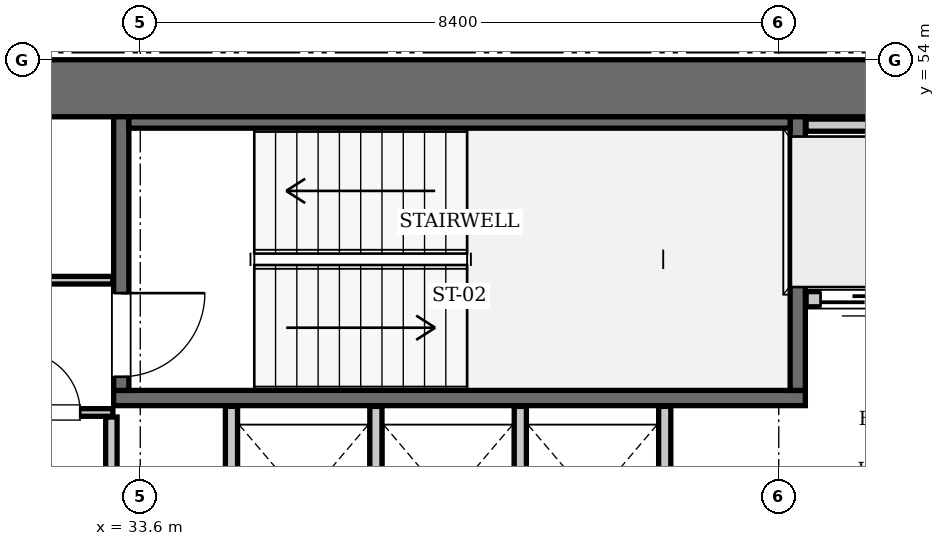
"""IFC4 building model, lengths in metres.
Left out: names, types, materials, properties, quantities, classifications, styles, units other than length and angle.
Written with IfcOpenShell. Run it as: python <this file> out.ifc"""

import sys

from ifc_helpers import new_model, si_unit, direction, frame, frame_2d, origin, place, context, subcontext, project, spatial, rectangle, extrude, element, fill, save


model = new_model("IFC4")
c1 = context("Model", 3, precision=1e-05, world=origin(), true_north=direction((0.0, 1.0)))
c2 = subcontext(c1, "Body", "Model", "MODEL_VIEW")
j1 = project(units=[si_unit("LENGTHUNIT", "METRE"), si_unit("PLANEANGLEUNIT", "RADIAN")], contexts=[c1])
p1 = place(None, origin())
s1 = spatial("IfcSite", under=j1, at=p1, CompositionType="ELEMENT")
p2 = place(p1, origin())
s2 = spatial("IfcBuilding", under=s1, at=p2, CompositionType="ELEMENT")
p3 = place(p2, frame((0.0, 0.0, 138.95)))
s3 = spatial("IfcBuildingStorey", under=s2, at=p3, CompositionType="ELEMENT", Elevation=138.95)
p4 = place(p3, frame((25.2, 53.625, 0.0), z_axis=(0.0, 0.0, 1.0), x_axis=(1.0, 0.0, 0.0)))
e1 = element("IfcWall", 1, at=p4, inside=s3, PredefinedType="SHEAR", context=c2, shape_type="SweptSolid", body=[
    extrude(rectangle(XDim=25.2, YDim=0.75, at=frame_2d((12.6, 0.0))), origin(), (0.0, 0.0, 1.0), 3.85),
])
p5 = place(p3, frame((33.25, 49.55, 0.0), z_axis=(0.0, 0.0, 1.0), x_axis=(1.0, 0.0, 0.0)))
e2 = element("IfcWall", 2, at=p5, inside=s3, PredefinedType="SOLIDWALL", context=c2, shape_type="SweptSolid", body=[
    extrude(rectangle(XDim=9.1, YDim=0.2, at=frame_2d((4.55, 0.0))), origin(), (0.0, 0.0, 1.0), 3.61),
])
p6 = place(p3, frame((42.25, 49.65, 0.0), z_axis=(0.0, 0.0, 1.0), x_axis=(0.0, 1.0, 0.0)))
e3 = element("IfcWall", 3, at=p6, inside=s3, PredefinedType="SOLIDWALL", context=c2, shape_type="SweptSolid", body=[
    extrude(rectangle(XDim=3.6, YDim=0.2, at=frame_2d((1.8, 0.0))), origin(), (0.0, 0.0, 1.0), 3.61),
])
p7 = place(p3, frame((33.35, 49.65, 0.0), z_axis=(0.0, 0.0, 1.0), x_axis=(0.0, 1.0, 0.0)))
e4 = element("IfcWall", 4, at=p7, inside=s3, PredefinedType="SOLIDWALL", context=c2, shape_type="SweptSolid", body=[
    extrude(rectangle(XDim=3.6, YDim=0.2, at=frame_2d((1.8, 0.0))), origin(), (0.0, 0.0, 1.0), 3.61),
])
p8 = place(p7, frame((0.18, 0.0, 0.0)))
e5 = element("IfcOpeningElement", 5, at=p8, cuts=e4, PredefinedType="OPENING", context=c2, shape_type="SweptSolid", body=[
    extrude(rectangle(XDim=1.1, YDim=2.15, at=frame_2d((0.55, 1.075))), frame((0.0, 0.11, 0.0), z_axis=(0.0, -1.0, 0.0), x_axis=(1.0, 0.0, 0.0)), (0.0, 0.0, 1.0), 0.22),
])
p9 = place(p3, frame((33.45, 53.175, 0.0), z_axis=(0.0, 0.0, 1.0), x_axis=(1.0, 0.0, 0.0)))
e6 = element("IfcWall", 6, at=p9, inside=s3, PredefinedType="SOLIDWALL", context=c2, shape_type="SweptSolid", body=[
    extrude(rectangle(XDim=8.7, YDim=0.15, at=frame_2d((4.35, 0.0))), origin(), (0.0, 0.0, 1.0), 3.61),
])
p10 = place(p3, frame((42.36, 50.85, 0.0), z_axis=(0.0, 0.0, 1.0), x_axis=(1.0, 0.0, 0.0)))
e7 = element("IfcWall", 7, at=p10, inside=s3, PredefinedType="SOLIDWALL", context=c2, shape_type="SweptSolid", body=[
    extrude(rectangle(XDim=1.38, YDim=0.2, at=frame_2d((0.69, 0.0))), origin(), (0.0, 0.0, 1.0), 3.61),
])
p11 = place(p10, frame((0.19, 0.0, 0.0)))
e8 = element("IfcOpeningElement", 8, at=p11, cuts=e7, PredefinedType="OPENING", context=c2, shape_type="SweptSolid", body=[
    extrude(rectangle(XDim=1.0, YDim=2.15, at=frame_2d((0.5, 1.075))), frame((0.0, 0.11, 0.0), z_axis=(0.0, -1.0, 0.0), x_axis=(1.0, 0.0, 0.0)), (0.0, 0.0, 1.0), 0.22),
])
p12 = place(p3, frame((42.36, 53.14, 0.0), z_axis=(0.0, 0.0, 1.0), x_axis=(1.0, 0.0, 0.0)))
e9 = element("IfcWall", 9, at=p12, inside=s3, PredefinedType="SOLIDWALL", context=c2, shape_type="SweptSolid", body=[
    extrude(rectangle(XDim=3.14, YDim=0.16, at=frame_2d((1.57, 0.0))), origin(), (0.0, 0.0, 1.0), 3.61),
])
for number, where, z_axis, x_axis in (
    (10, (34.8, 47.25, 0.0), (0.0, 0.0, 1.0), (0.0, 1.0, 0.0)),
    (11, (36.7, 47.25, 0.0), (0.0, 0.0, 1.0), (0.0, 1.0, 0.0)),
    (12, (38.6, 47.25, 0.0), (0.0, 0.0, 1.0), (0.0, 1.0, 0.0)),
    (13, (40.5, 47.25, 0.0), (0.0, 0.0, 1.0), (0.0, 1.0, 0.0)),
):
    element("IfcWall", number, at=place(p3, frame(where, z_axis=z_axis, x_axis=x_axis)), inside=s3, PredefinedType="SOLIDWALL", context=c2, shape_type="SweptSolid", body=[
        extrude(rectangle(XDim=2.19, YDim=0.16, at=frame_2d((1.095, 0.0))), origin(), (0.0, 0.0, 1.0), 3.61),
    ])
p13 = place(p3, frame((33.22, 45.14, 0.0), z_axis=(0.0, 0.0, 1.0), x_axis=(0.0, 1.0, 0.0)))
e14 = element("IfcWall", 14, at=p13, inside=s3, PredefinedType="PARTITIONING", context=c2, shape_type="SweptSolid", body=[
    extrude(rectangle(XDim=4.16, YDim=0.15, at=frame_2d((2.08, 0.0))), origin(), (0.0, 0.0, 1.0), 3.61),
])
p14 = place(p3, frame((30.06, 49.36, 0.0), z_axis=(0.0, 0.0, 1.0), x_axis=(1.0, 0.0, 0.0)))
e15 = element("IfcWall", 15, at=p14, inside=s3, PredefinedType="PARTITIONING", context=c2, shape_type="SweptSolid", body=[
    extrude(rectangle(XDim=3.18, YDim=0.1, at=frame_2d((1.59, 0.0))), origin(), (0.0, 0.0, 1.0), 3.61),
])
p15 = place(p14, frame((1.95, 0.0, 0.0)))
e16 = element("IfcOpeningElement", 16, at=p15, cuts=e15, PredefinedType="OPENING", context=c2, shape_type="SweptSolid", body=[
    extrude(rectangle(XDim=0.8, YDim=2.05, at=frame_2d((0.4, 1.025))), frame((0.0, 0.06, 0.0), z_axis=(0.0, -1.0, 0.0), x_axis=(1.0, 0.0, 0.0)), (0.0, 0.0, 1.0), 0.12),
])
p16 = place(p3, frame((31.82, 51.1, 0.0), z_axis=(0.0, 0.0, 1.0), x_axis=(1.0, 0.0, 0.0)))
e17 = element("IfcWall", 17, at=p16, inside=s3, PredefinedType="PARTITIONING", context=c2, shape_type="SweptSolid", body=[
    extrude(rectangle(XDim=1.42, YDim=0.1, at=frame_2d((0.71, 0.0))), origin(), (0.0, 0.0, 1.0), 3.61),
])
p17 = place(p8, frame((1.1, 0.0, 0.0), z_axis=(0.0, 0.0, 1.0), x_axis=(-1.0, 0.0, 0.0)))
e18 = element("IfcDoor", 18, at=p17, inside=s3, OperationType="SINGLE_SWING_LEFT", PredefinedType="DOOR", context=c2, shape_type="SweptSolid", body=[
    extrude(rectangle(XDim=1.1, YDim=2.15, at=frame_2d((0.55, 1.075))), frame((0.0, 0.025, 0.0), z_axis=(0.0, -1.0, 0.0), x_axis=(1.0, 0.0, 0.0)), (0.0, 0.0, 1.0), 0.05),
])
fill(e5, e18)
p18 = place(p11, frame((1.0, 0.0, 0.0), z_axis=(0.0, 0.0, 1.0), x_axis=(-1.0, 0.0, 0.0)))
e19 = element("IfcDoor", 19, at=p18, inside=s3, OperationType="SLIDING_TO_LEFT", PredefinedType="DOOR", context=c2, shape_type="SweptSolid", body=[
    extrude(rectangle(XDim=1.0, YDim=2.15, at=frame_2d((0.5, 1.075))), frame((0.0, 0.025, 0.0), z_axis=(0.0, -1.0, 0.0), x_axis=(1.0, 0.0, 0.0)), (0.0, 0.0, 1.0), 0.05),
])
fill(e8, e19)
p19 = place(p15, origin())
e20 = element("IfcDoor", 20, at=p19, inside=s3, OperationType="SINGLE_SWING_LEFT", PredefinedType="DOOR", context=c2, shape_type="SweptSolid", body=[
    extrude(rectangle(XDim=0.8, YDim=2.05, at=frame_2d((0.4, 1.025))), frame((0.0, 0.025, 0.0), z_axis=(0.0, -1.0, 0.0), x_axis=(1.0, 0.0, 0.0)), (0.0, 0.0, 1.0), 0.05),
])
fill(e16, e20)
save(model, sys.argv[1])
